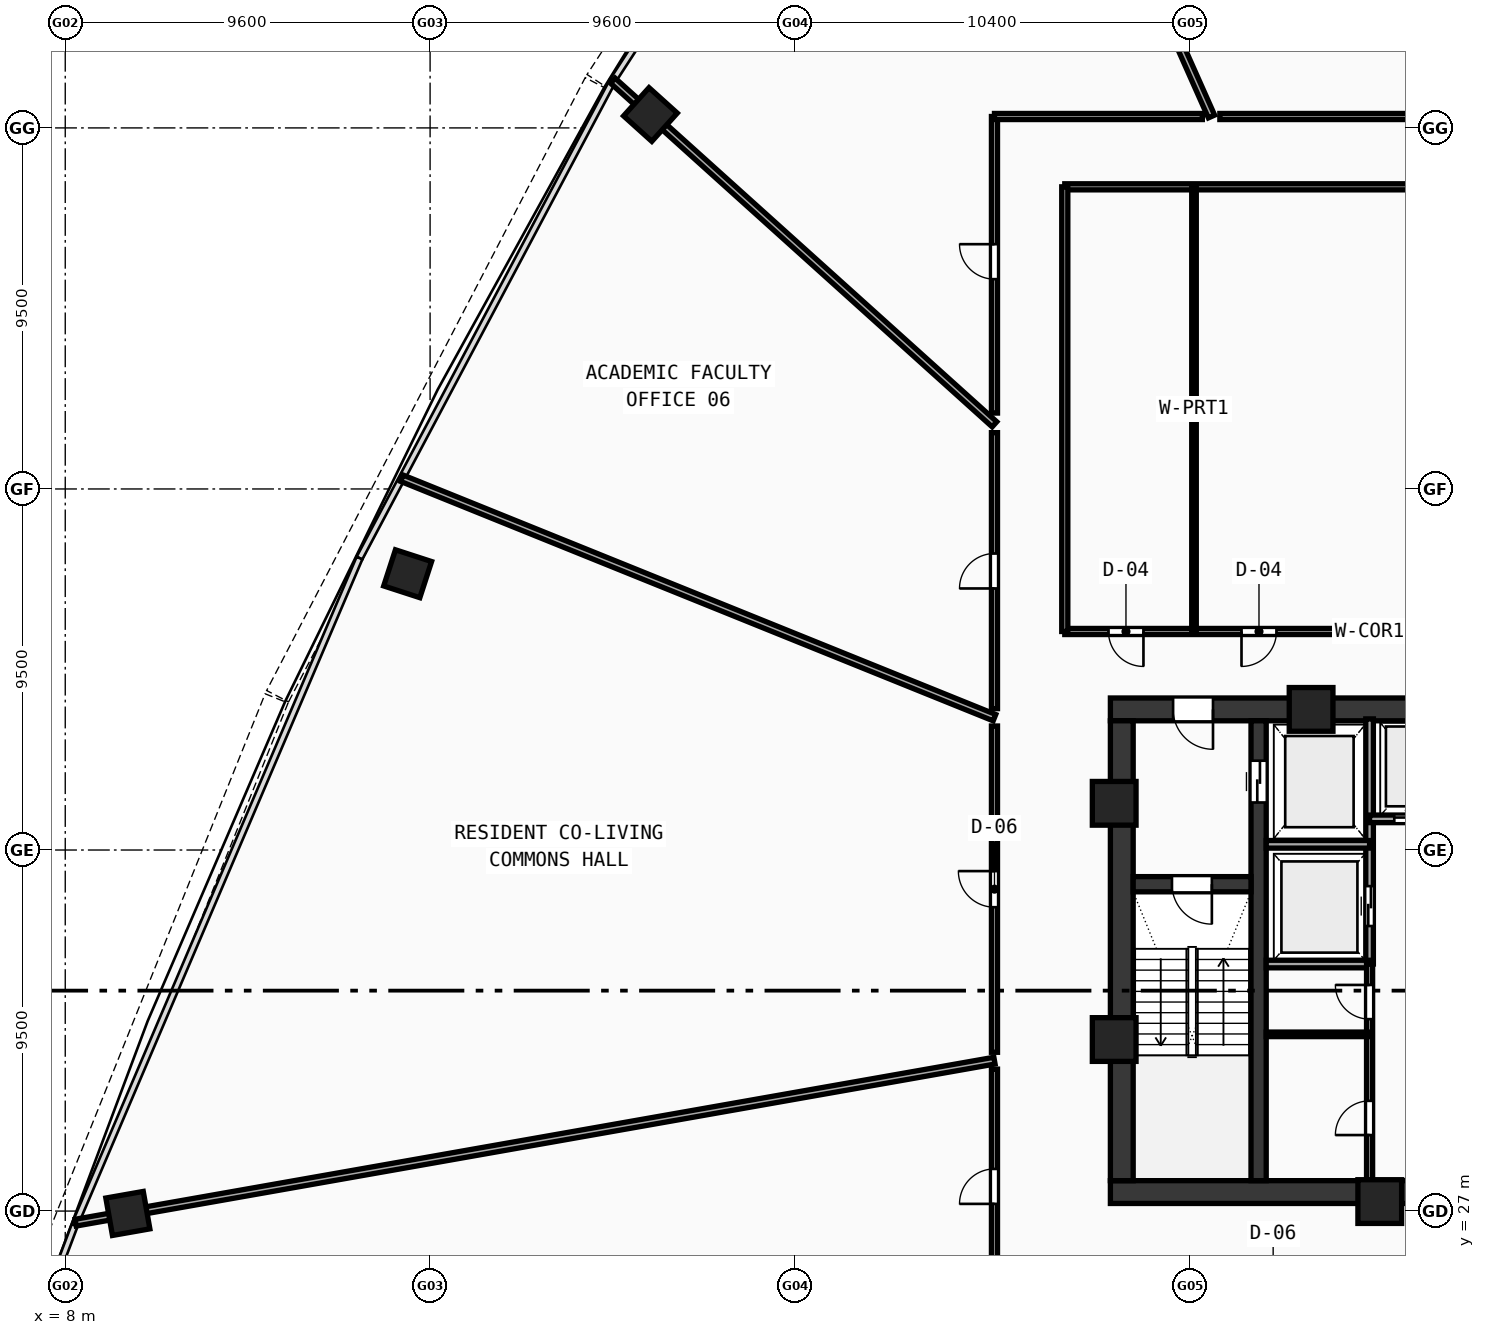
"""IFC4 building model, lengths in metres.
Left out: names, types, materials, properties, quantities, classifications, styles, units other than length and angle.
Written with IfcOpenShell. Run it as: python <this file> out.ifc"""

import sys

from ifc_helpers import new_model, si_unit, direction, frame, frame_2d, origin, origin_with_axes, origin_2d, place, context, subcontext, project, spatial, rectangle, hollow_rectangle, extrude, source, transform, mapped, element, fill, save


model = new_model("IFC4")
c1 = context("Model", 3, precision=1e-05, world=origin(), true_north=direction((0.0, 1.0)))
c2 = subcontext(c1, "Body", "Model", "MODEL_VIEW")
j1 = project(units=[si_unit("LENGTHUNIT", "METRE"), si_unit("PLANEANGLEUNIT", "RADIAN")], contexts=[c1])
p1 = place(None, origin())
s1 = spatial("IfcSite", under=j1, at=p1, CompositionType="ELEMENT")
p2 = place(p1, origin())
s2 = spatial("IfcBuilding", under=s1, at=p2, CompositionType="ELEMENT")
p3 = place(p2, frame((0.0, 0.0, 115.38)))
s3 = spatial("IfcBuildingStorey", under=s2, at=p3, CompositionType="ELEMENT", Elevation=115.38)
p4 = place(p3, frame((35.5, 27.5, 0.0), z_axis=(0.0, 0.0, 1.0), x_axis=(1.0, 0.0, 0.0)))
e1 = element("IfcWall", 1, at=p4, inside=s3, PredefinedType="SHEAR", context=c2, shape_type="SweptSolid", body=[
    extrude(rectangle(XDim=25.0, YDim=0.6, at=frame_2d((12.5, 0.0))), origin(), (0.0, 0.0, 1.0), 3.52),
])
p5 = place(p3, frame((35.5, 40.2, 0.0), z_axis=(0.0, 0.0, 1.0), x_axis=(1.0, 0.0, 0.0)))
e2 = element("IfcWall", 2, at=p5, inside=s3, PredefinedType="SHEAR", context=c2, shape_type="SweptSolid", body=[
    extrude(rectangle(XDim=11.3, YDim=0.6, at=frame_2d((5.65, 0.0))), origin(), (0.0, 0.0, 1.0), 3.52),
])
p6 = place(p5, frame((1.65, 0.0, 0.0)))
e3 = element("IfcOpeningElement", 3, at=p6, cuts=e2, PredefinedType="OPENING", context=c2, shape_type="SweptSolid", body=[
    extrude(rectangle(XDim=1.05, YDim=2.1, at=frame_2d((0.525, 1.05))), frame((0.0, 0.31, 0.0), z_axis=(0.0, -1.0, 0.0), x_axis=(1.0, 0.0, 0.0)), (0.0, 0.0, 1.0), 0.62),
])
p7 = place(p3, frame((35.8, 27.8, 0.0), z_axis=(0.0, 0.0, 1.0), x_axis=(0.0, 1.0, 0.0)))
e4 = element("IfcWall", 4, at=p7, inside=s3, PredefinedType="SHEAR", context=c2, shape_type="SweptSolid", body=[
    extrude(rectangle(XDim=12.1, YDim=0.6, at=frame_2d((6.05, 0.0))), origin(), (0.0, 0.0, 1.0), 3.52),
])
p8 = place(p3, frame((39.4, 27.8, 0.0), z_axis=(0.0, 0.0, 1.0), x_axis=(0.0, 1.0, 0.0)))
e5 = element("IfcWall", 5, at=p8, inside=s3, PredefinedType="SHEAR", context=c2, shape_type="SweptSolid", body=[
    extrude(rectangle(XDim=12.1, YDim=0.4, at=frame_2d((6.05, 0.0))), origin(), (0.0, 0.0, 1.0), 3.52),
])
p9 = place(p8, frame((9.95, 0.0, 0.0)))
e6 = element("IfcOpeningElement", 6, at=p9, cuts=e5, PredefinedType="OPENING", context=c2, shape_type="SweptSolid", body=[
    extrude(rectangle(XDim=1.1, YDim=2.1, at=frame_2d((0.55, 1.05))), frame((0.0, 0.21, 0.0), z_axis=(0.0, -1.0, 0.0), x_axis=(1.0, 0.0, 0.0)), (0.0, 0.0, 1.0), 0.42),
])
p10 = place(p3, frame((36.1, 35.6, 0.0), z_axis=(0.0, 0.0, 1.0), x_axis=(1.0, 0.0, 0.0)))
e7 = element("IfcWall", 7, at=p10, inside=s3, PredefinedType="SHEAR", context=c2, shape_type="SweptSolid", body=[
    extrude(rectangle(XDim=3.1, YDim=0.4, at=frame_2d((1.55, 0.0))), origin(), (0.0, 0.0, 1.0), 3.52),
])
p11 = place(p10, frame((1.02, 0.0, 0.0)))
e8 = element("IfcOpeningElement", 8, at=p11, cuts=e7, PredefinedType="OPENING", context=c2, shape_type="SweptSolid", body=[
    extrude(rectangle(XDim=1.05, YDim=2.1, at=frame_2d((0.525, 1.05))), frame((0.0, 0.21, 0.0), z_axis=(0.0, -1.0, 0.0), x_axis=(1.0, 0.0, 0.0)), (0.0, 0.0, 1.0), 0.42),
])
m1 = source(origin(), c2, "Body", "SweptSolid", [
    extrude(hollow_rectangle(XDim=1.15, YDim=1.15, WallThickness=0.048, at=origin_2d()), origin(), (0.0, 0.0, 1.0), 3.78),
])
for number, where, z_axis, x_axis in (
    (9, (42.588, 27.25, -0.26), (0.0, 0.0, 1.0), (1.0, 0.0, 0.0)),
    (10, (40.781, 40.2, -0.26), (0.0, 0.0, 1.0), (1.0, 0.0, 0.0)),
    (11, (35.6, 37.729, -0.26), (0.0, 0.0, 1.0), (1.0, 0.0, 0.0)),
    (12, (35.6, 31.513, -0.26), (0.0, 0.0, 1.0), (1.0, 0.0, 0.0)),
):
    element("IfcColumn", number, at=place(p3, frame(where, z_axis=z_axis, x_axis=x_axis)), inside=s3, PredefinedType="COLUMN", context=c2, shape_type="MappedRepresentation", body=[
        mapped(m1, transform((0.0, 0.0, 0.0), scale=1.0)),
    ])
m2 = source(origin(), c2, "Body", "SweptSolid", [
    extrude(hollow_rectangle(XDim=1.0, YDim=1.0, WallThickness=0.042, at=origin_2d()), origin(), (0.0, 0.0, 1.0), 3.78),
])
for number, where, z_axis, x_axis in (
    (13, (23.397, 55.852, -0.26), (0.0, 0.0, 1.0), (-0.669, -0.743, 0.0)),
    (14, (17.009, 43.77, -0.26), (0.0, 0.0, 1.0), (-0.309, -0.951, 0.0)),
    (15, (9.647, 26.938, -0.26), (0.0, 0.0, 1.0), (0.174, -0.985, 0.0)),
):
    element("IfcColumn", number, at=place(p3, frame(where, z_axis=z_axis, x_axis=x_axis)), inside=s3, PredefinedType="COLUMN", context=c2, shape_type="MappedRepresentation", body=[
        mapped(m2, transform((0.0, 0.0, 0.0), scale=1.0)),
    ])
p12 = place(p3, frame((42.32, 33.5, 0.0), z_axis=(0.0, 0.0, 1.0), x_axis=(0.0, 1.0, 0.0)))
e16 = element("IfcWall", 16, at=p12, inside=s3, PredefinedType="SOLIDWALL", context=c2, shape_type="SweptSolid", body=[
    extrude(rectangle(XDim=6.45, YDim=0.2, at=frame_2d((3.225, 0.0))), origin(), (0.0, 0.0, 1.0), 3.52),
])
p13 = place(p12, frame((1.0, 0.0, 0.0)))
e17 = element("IfcOpeningElement", 17, at=p13, cuts=e16, PredefinedType="OPENING", context=c2, shape_type="SweptSolid", body=[
    extrude(rectangle(XDim=1.05, YDim=2.1, at=frame_2d((0.525, 1.05))), frame((0.0, 0.11, 0.0), z_axis=(0.0, -1.0, 0.0), x_axis=(1.0, 0.0, 0.0)), (0.0, 0.0, 1.0), 0.22),
])
for number, where, z_axis, x_axis in (
    (18, (39.6, 36.65, 0.0), (0.0, 0.0, 1.0), (1.0, 0.0, 0.0)),
    (19, (39.6, 33.5, 0.0), (0.0, 0.0, 1.0), (1.0, 0.0, 0.0)),
):
    element("IfcWall", number, at=place(p3, frame(where, z_axis=z_axis, x_axis=x_axis)), inside=s3, PredefinedType="SOLIDWALL", context=c2, shape_type="SweptSolid", body=[
        extrude(rectangle(XDim=2.72, YDim=0.2, at=frame_2d((1.36, 0.0))), origin(), (0.0, 0.0, 1.0), 3.52),
    ])
p14 = place(p3, frame((42.32, 37.32, 0.0), z_axis=(0.0, 0.0, 1.0), x_axis=(1.0, 0.0, 0.0)))
e20 = element("IfcWall", 20, at=p14, inside=s3, PredefinedType="SOLIDWALL", context=c2, shape_type="SweptSolid", body=[
    extrude(rectangle(XDim=4.73, YDim=0.2, at=frame_2d((2.365, 0.0))), origin(), (0.0, 0.0, 1.0), 3.52),
])
p15 = place(p14, frame((0.65, 0.0, 0.0)))
e21 = element("IfcOpeningElement", 21, at=p15, cuts=e20, PredefinedType="OPENING", context=c2, shape_type="SweptSolid", body=[
    extrude(rectangle(XDim=1.05, YDim=2.1, at=frame_2d((0.525, 1.05))), frame((0.0, 0.11, 0.0), z_axis=(0.0, -1.0, 0.0), x_axis=(1.0, 0.0, 0.0)), (0.0, 0.0, 1.0), 0.22),
])
p16 = place(p14, frame((2.95, 0.0, 0.0)))
e22 = element("IfcOpeningElement", 22, at=p16, cuts=e20, PredefinedType="OPENING", context=c2, shape_type="SweptSolid", body=[
    extrude(rectangle(XDim=1.05, YDim=2.1, at=frame_2d((0.525, 1.05))), frame((0.0, 0.11, 0.0), z_axis=(0.0, -1.0, 0.0), x_axis=(1.0, 0.0, 0.0)), (0.0, 0.0, 1.0), 0.22),
])
p17 = place(p3, frame((42.32, 27.6, 0.0), z_axis=(0.0, 0.0, 1.0), x_axis=(0.0, 1.0, 0.0)))
e23 = element("IfcWall", 23, at=p17, inside=s3, PredefinedType="PARTITIONING", context=c2, shape_type="SweptSolid", body=[
    extrude(rectangle(XDim=5.9, YDim=0.16, at=frame_2d((2.95, 0.0))), origin(), (0.0, 0.0, 1.0), 3.52),
])
p18 = place(p17, frame((1.4, 0.0, 0.0)))
e24 = element("IfcOpeningElement", 24, at=p18, cuts=e23, PredefinedType="OPENING", context=c2, shape_type="SweptSolid", body=[
    extrude(rectangle(XDim=0.9, YDim=2.1, at=frame_2d((0.45, 1.05))), frame((0.0, 0.09, 0.0), z_axis=(0.0, -1.0, 0.0), x_axis=(1.0, 0.0, 0.0)), (0.0, 0.0, 1.0), 0.18),
])
p19 = place(p17, frame((4.45, 0.0, 0.0)))
e25 = element("IfcOpeningElement", 25, at=p19, cuts=e23, PredefinedType="OPENING", context=c2, shape_type="SweptSolid", body=[
    extrude(rectangle(XDim=0.9, YDim=2.1, at=frame_2d((0.45, 1.05))), frame((0.0, 0.09, 0.0), z_axis=(0.0, -1.0, 0.0), x_axis=(1.0, 0.0, 0.0)), (0.0, 0.0, 1.0), 0.18),
])
p20 = place(p3, frame((39.6, 31.65, 0.0), z_axis=(0.0, 0.0, 1.0), x_axis=(1.0, 0.0, 0.0)))
e26 = element("IfcWall", 26, at=p20, inside=s3, PredefinedType="PARTITIONING", context=c2, shape_type="SweptSolid", body=[
    extrude(rectangle(XDim=2.72, YDim=0.12, at=frame_2d((1.36, 0.0))), origin(), (0.0, 0.0, 1.0), 3.52),
])
p21 = place(p3, frame((34.3, 42.25, 0.0), z_axis=(0.0, 0.0, 1.0), x_axis=(1.0, 0.0, 0.0)))
e27 = element("IfcWall", 27, at=p21, inside=s3, PredefinedType="PARTITIONING", context=c2, shape_type="SweptSolid", body=[
    extrude(rectangle(XDim=9.58, YDim=0.16, at=frame_2d((4.79, 0.0))), origin(), (0.0, 0.0, 1.0), 2.82),
])
p22 = place(p21, frame((1.15, 0.0, 0.0)))
e28 = element("IfcOpeningElement", 28, at=p22, cuts=e27, PredefinedType="OPENING", context=c2, shape_type="SweptSolid", body=[
    extrude(rectangle(XDim=0.92, YDim=2.1, at=frame_2d((0.46, 1.05))), frame((0.0, 0.09, 0.0), z_axis=(0.0, -1.0, 0.0), x_axis=(1.0, 0.0, 0.0)), (0.0, 0.0, 1.0), 0.18),
])
p23 = place(p21, frame((4.65, 0.0, 0.0)))
e29 = element("IfcOpeningElement", 29, at=p23, cuts=e27, PredefinedType="OPENING", context=c2, shape_type="SweptSolid", body=[
    extrude(rectangle(XDim=0.92, YDim=2.1, at=frame_2d((0.46, 1.05))), frame((0.0, 0.09, 0.0), z_axis=(0.0, -1.0, 0.0), x_axis=(1.0, 0.0, 0.0)), (0.0, 0.0, 1.0), 0.18),
])
p24 = place(p3, frame((34.3, 53.95, 0.0), z_axis=(0.0, 0.0, 1.0), x_axis=(1.0, 0.0, 0.0)))
e30 = element("IfcWall", 30, at=p24, inside=s3, PredefinedType="PARTITIONING", context=c2, shape_type="SweptSolid", body=[
    extrude(rectangle(XDim=9.58, YDim=0.16, at=frame_2d((4.79, 0.0))), origin(), (0.0, 0.0, 1.0), 2.82),
])
p25 = place(p3, frame((34.3, 42.25, 0.0), z_axis=(0.0, 0.0, 1.0), x_axis=(0.0, 1.0, 0.0)))
e31 = element("IfcWall", 31, at=p25, inside=s3, PredefinedType="PARTITIONING", context=c2, shape_type="SweptSolid", body=[
    extrude(rectangle(XDim=11.7, YDim=0.16, at=frame_2d((5.85, 0.0))), origin(), (0.0, 0.0, 1.0), 2.82),
])
p26 = place(p3, frame((37.7, 42.25, 0.0), z_axis=(0.0, 0.0, 1.0), x_axis=(0.0, 1.0, 0.0)))
e32 = element("IfcWall", 32, at=p26, inside=s3, PredefinedType="PARTITIONING", context=c2, shape_type="SweptSolid", body=[
    extrude(rectangle(XDim=11.7, YDim=0.12, at=frame_2d((5.85, 0.0))), origin(), (0.0, 0.0, 1.0), 2.82),
])
p27 = place(p3, frame((38.16, 55.8, 0.0), z_axis=(0.0, 0.0, 1.0), x_axis=(-0.406727469891, 0.913549541753, 0.0)))
e33 = element("IfcWall", 33, at=p27, inside=s3, PredefinedType="PARTITIONING", context=c2, shape_type="SweptSolid", body=[
    extrude(rectangle(XDim=16.381, YDim=0.18, at=frame_2d((8.19, 0.0))), origin(), (0.0, 0.0, 1.0), 2.82),
])
p28 = place(p3, frame((32.45, 47.701, 0.0), z_axis=(0.0, 0.0, 1.0), x_axis=(-0.743139607037, 0.669136401979, 0.0)))
e34 = element("IfcWall", 34, at=p28, inside=s3, PredefinedType="PARTITIONING", context=c2, shape_type="SweptSolid", body=[
    extrude(rectangle(XDim=13.513, YDim=0.18, at=frame_2d((6.756, 0.0))), origin(), (0.0, 0.0, 1.0), 2.82),
])
p29 = place(p3, frame((32.45, 39.983, 0.0), z_axis=(0.0, 0.0, 1.0), x_axis=(-0.927182599154, 0.374609700656, 0.0)))
e35 = element("IfcWall", 35, at=p29, inside=s3, PredefinedType="PARTITIONING", context=c2, shape_type="SweptSolid", body=[
    extrude(rectangle(XDim=16.818, YDim=0.18, at=frame_2d((8.409, 0.0))), origin(), (0.0, 0.0, 1.0), 2.82),
])
p30 = place(p3, frame((32.45, 30.958, 0.0), z_axis=(0.0, 0.0, 1.0), x_axis=(-0.984808478557, -0.17364406285, 0.0)))
e36 = element("IfcWall", 36, at=p30, inside=s3, PredefinedType="PARTITIONING", context=c2, shape_type="SweptSolid", body=[
    extrude(rectangle(XDim=24.549, YDim=0.18, at=frame_2d((12.274, 0.0))), origin(), (0.0, 0.0, 1.0), 2.82),
])
p31 = place(p3, frame((32.45, 24.8, 0.0), z_axis=(0.0, 0.0, 1.0), x_axis=(0.0, 1.0, 0.0)))
e37 = element("IfcWall", 37, at=p31, inside=s3, PredefinedType="PARTITIONING", context=c2, shape_type="SweptSolid", body=[
    extrude(rectangle(XDim=5.935, YDim=0.16, at=frame_2d((2.967, 0.0))), origin(), (0.0, 0.0, 1.0), 3.12),
])
p32 = place(p31, frame((2.389, 0.0, 0.0)))
e38 = element("IfcOpeningElement", 38, at=p32, cuts=e37, PredefinedType="OPENING", context=c2, shape_type="SweptSolid", body=[
    extrude(rectangle(XDim=0.92, YDim=2.1, at=frame_2d((0.46, 1.05))), frame((0.0, 0.09, 0.0), z_axis=(0.0, -1.0, 0.0), x_axis=(1.0, 0.0, 0.0)), (0.0, 0.0, 1.0), 0.18),
])
p33 = place(p3, frame((32.45, 31.178, 0.0), z_axis=(0.0, 0.0, 1.0), x_axis=(0.0, 1.0, 0.0)))
e39 = element("IfcWall", 39, at=p33, inside=s3, PredefinedType="PARTITIONING", context=c2, shape_type="SweptSolid", body=[
    extrude(rectangle(XDim=8.585, YDim=0.16, at=frame_2d((4.292, 0.0))), origin(), (0.0, 0.0, 1.0), 2.82),
])
p34 = place(p33, frame((3.817, 0.0, 0.0)))
e40 = element("IfcOpeningElement", 40, at=p34, cuts=e39, PredefinedType="OPENING", context=c2, shape_type="SweptSolid", body=[
    extrude(rectangle(XDim=0.95, YDim=2.1, at=frame_2d((0.475, 1.05))), frame((0.0, 0.09, 0.0), z_axis=(0.0, -1.0, 0.0), x_axis=(1.0, 0.0, 0.0)), (0.0, 0.0, 1.0), 0.18),
])
p35 = place(p3, frame((32.45, 40.22, 0.0), z_axis=(0.0, 0.0, 1.0), x_axis=(0.0, 1.0, 0.0)))
e41 = element("IfcWall", 41, at=p35, inside=s3, PredefinedType="PARTITIONING", context=c2, shape_type="SweptSolid", body=[
    extrude(rectangle(XDim=7.262, YDim=0.16, at=frame_2d((3.631, 0.0))), origin(), (0.0, 0.0, 1.0), 2.82),
])
p36 = place(p35, frame((3.162, 0.0, 0.0)))
e42 = element("IfcOpeningElement", 42, at=p36, cuts=e41, PredefinedType="OPENING", context=c2, shape_type="SweptSolid", body=[
    extrude(rectangle(XDim=0.92, YDim=2.1, at=frame_2d((0.46, 1.05))), frame((0.0, 0.09, 0.0), z_axis=(0.0, -1.0, 0.0), x_axis=(1.0, 0.0, 0.0)), (0.0, 0.0, 1.0), 0.18),
])
p37 = place(p3, frame((32.45, 47.997, 0.0), z_axis=(0.0, 0.0, 1.0), x_axis=(0.0, 1.0, 0.0)))
e43 = element("IfcWall", 43, at=p37, inside=s3, PredefinedType="PARTITIONING", context=c2, shape_type="SweptSolid", body=[
    extrude(rectangle(XDim=7.803, YDim=0.16, at=frame_2d((3.901, 0.0))), origin(), (0.0, 0.0, 1.0), 3.12),
])
p38 = place(p37, frame((3.523, 0.0, 0.0)))
e44 = element("IfcOpeningElement", 44, at=p38, cuts=e43, PredefinedType="OPENING", context=c2, shape_type="SweptSolid", body=[
    extrude(rectangle(XDim=0.92, YDim=2.1, at=frame_2d((0.46, 1.05))), frame((0.0, 0.09, 0.0), z_axis=(0.0, -1.0, 0.0), x_axis=(1.0, 0.0, 0.0)), (0.0, 0.0, 1.0), 0.18),
])
p39 = place(p3, frame((32.45, 55.8, 0.0), z_axis=(0.0, 0.0, 1.0), x_axis=(1.0, 0.0, 0.0)))
e45 = element("IfcWall", 45, at=p39, inside=s3, PredefinedType="PARTITIONING", context=c2, shape_type="SweptSolid", body=[
    extrude(rectangle(XDim=5.47, YDim=0.16, at=frame_2d((2.735, 0.0))), origin(), (0.0, 0.0, 1.0), 3.12),
])
p40 = place(p3, frame((38.38, 55.8, 0.0), z_axis=(0.0, 0.0, 1.0), x_axis=(1.0, 0.0, 0.0)))
e46 = element("IfcWall", 46, at=p40, inside=s3, PredefinedType="PARTITIONING", context=c2, shape_type="SweptSolid", body=[
    extrude(rectangle(XDim=5.329, YDim=0.16, at=frame_2d((2.665, 0.0))), origin(), (0.0, 0.0, 1.0), 2.82),
])
m3 = source(origin(), c2, "Body", "SweptSolid", [
    extrude(rectangle(XDim=1.05, YDim=2.1, at=frame_2d((0.525, 1.05))), frame((0.0, 0.025, 0.0), z_axis=(0.0, -1.0, 0.0), x_axis=(1.0, 0.0, 0.0)), (0.0, 0.0, 1.0), 0.05),
])
p41 = place(p11, frame((1.05, 0.0, 0.0), z_axis=(0.0, 0.0, 1.0), x_axis=(-1.0, 0.0, 0.0)))
e47 = element("IfcDoor", 47, at=p41, inside=s3, OperationType="SINGLE_SWING_LEFT", PredefinedType="DOOR", context=c2, shape_type="MappedRepresentation", body=[
    mapped(m3, transform((0.0, 0.0, 0.0), scale=1.0)),
])
fill(e8, e47)
p42 = place(p6, frame((1.05, 0.0, 0.0), z_axis=(0.0, 0.0, 1.0), x_axis=(-1.0, 0.0, 0.0)))
e48 = element("IfcDoor", 48, at=p42, inside=s3, OperationType="SINGLE_SWING_LEFT", PredefinedType="DOOR", context=c2, shape_type="MappedRepresentation", body=[
    mapped(m3, transform((0.0, 0.0, 0.0), scale=1.0)),
])
fill(e3, e48)
m4 = source(origin(), c2, "Body", "SweptSolid", [
    extrude(rectangle(XDim=1.1, YDim=2.1, at=frame_2d((0.55, 1.05))), frame((0.0, 0.025, 0.0), z_axis=(0.0, -1.0, 0.0), x_axis=(1.0, 0.0, 0.0)), (0.0, 0.0, 1.0), 0.05),
])
p43 = place(p9, frame((1.1, 0.0, 0.0), z_axis=(0.0, 0.0, 1.0), x_axis=(-1.0, 0.0, 0.0)))
e49 = element("IfcDoor", 49, at=p43, inside=s3, OperationType="DOUBLE_DOOR_SLIDING", PredefinedType="DOOR", context=c2, shape_type="MappedRepresentation", body=[
    mapped(m4, transform((0.0, 0.0, 0.0), scale=1.0)),
])
fill(e6, e49)
p44 = place(p13, origin_with_axes())
e50 = element("IfcDoor", 50, at=p44, inside=s3, OperationType="DOUBLE_DOOR_SLIDING", PredefinedType="DOOR", context=c2, shape_type="MappedRepresentation", body=[
    mapped(m3, transform((0.0, 0.0, 0.0), scale=1.0)),
])
fill(e17, e50)
p45 = place(p15, frame((1.05, 0.0, 0.0), z_axis=(0.0, 0.0, 1.0), x_axis=(-1.0, 0.0, 0.0)))
e51 = element("IfcDoor", 51, at=p45, inside=s3, OperationType="DOUBLE_DOOR_SLIDING", PredefinedType="DOOR", context=c2, shape_type="MappedRepresentation", body=[
    mapped(m3, transform((0.0, 0.0, 0.0), scale=1.0)),
])
fill(e21, e51)
m5 = source(origin(), c2, "Body", "SweptSolid", [
    extrude(rectangle(XDim=0.9, YDim=2.1, at=frame_2d((0.45, 1.05))), frame((0.0, 0.025, 0.0), z_axis=(0.0, -1.0, 0.0), x_axis=(1.0, 0.0, 0.0)), (0.0, 0.0, 1.0), 0.05),
])
p46 = place(p18, origin_with_axes())
e52 = element("IfcDoor", 52, at=p46, inside=s3, OperationType="SINGLE_SWING_LEFT", PredefinedType="DOOR", context=c2, shape_type="MappedRepresentation", body=[
    mapped(m5, transform((0.0, 0.0, 0.0), scale=1.0)),
])
fill(e24, e52)
p47 = place(p19, origin_with_axes())
e53 = element("IfcDoor", 53, at=p47, inside=s3, OperationType="SINGLE_SWING_RIGHT", PredefinedType="DOOR", context=c2, shape_type="MappedRepresentation", body=[
    mapped(m5, transform((0.0, 0.0, 0.0), scale=1.0)),
])
fill(e25, e53)
m6 = source(origin(), c2, "Body", "SweptSolid", [
    extrude(rectangle(XDim=0.92, YDim=2.1, at=frame_2d((0.46, 1.05))), frame((0.0, 0.025, 0.0), z_axis=(0.0, -1.0, 0.0), x_axis=(1.0, 0.0, 0.0)), (0.0, 0.0, 1.0), 0.05),
])
p48 = place(p22, frame((0.92, 0.0, 0.0), z_axis=(0.0, 0.0, 1.0), x_axis=(-1.0, 0.0, 0.0)))
e54 = element("IfcDoor", 54, at=p48, inside=s3, OperationType="SINGLE_SWING_LEFT", PredefinedType="DOOR", context=c2, shape_type="MappedRepresentation", body=[
    mapped(m6, transform((0.0, 0.0, 0.0), scale=1.0)),
])
fill(e28, e54)
p49 = place(p23, frame((0.92, 0.0, 0.0), z_axis=(0.0, 0.0, 1.0), x_axis=(-1.0, 0.0, 0.0)))
e55 = element("IfcDoor", 55, at=p49, inside=s3, OperationType="SINGLE_SWING_RIGHT", PredefinedType="DOOR", context=c2, shape_type="MappedRepresentation", body=[
    mapped(m6, transform((0.0, 0.0, 0.0), scale=1.0)),
])
fill(e29, e55)
p50 = place(p38, origin_with_axes())
e56 = element("IfcDoor", 56, at=p50, inside=s3, OperationType="SINGLE_SWING_RIGHT", PredefinedType="DOOR", context=c2, shape_type="MappedRepresentation", body=[
    mapped(m6, transform((0.0, 0.0, 0.0), scale=1.0)),
])
fill(e44, e56)
p51 = place(p36, origin_with_axes())
e57 = element("IfcDoor", 57, at=p51, inside=s3, OperationType="SINGLE_SWING_LEFT", PredefinedType="DOOR", context=c2, shape_type="MappedRepresentation", body=[
    mapped(m6, transform((0.0, 0.0, 0.0), scale=1.0)),
])
fill(e42, e57)
m7 = source(origin(), c2, "Body", "SweptSolid", [
    extrude(rectangle(XDim=0.95, YDim=2.1, at=frame_2d((0.475, 1.05))), frame((0.0, 0.025, 0.0), z_axis=(0.0, -1.0, 0.0), x_axis=(1.0, 0.0, 0.0)), (0.0, 0.0, 1.0), 0.05),
])
p52 = place(p34, origin_with_axes())
e58 = element("IfcDoor", 58, at=p52, inside=s3, OperationType="SINGLE_SWING_RIGHT", PredefinedType="DOOR", context=c2, shape_type="MappedRepresentation", body=[
    mapped(m7, transform((0.0, 0.0, 0.0), scale=1.0)),
])
fill(e40, e58)
p53 = place(p32, origin_with_axes())
e59 = element("IfcDoor", 59, at=p53, inside=s3, OperationType="SINGLE_SWING_LEFT", PredefinedType="DOOR", context=c2, shape_type="MappedRepresentation", body=[
    mapped(m6, transform((0.0, 0.0, 0.0), scale=1.0)),
])
fill(e38, e59)
save(model, sys.argv[1])
